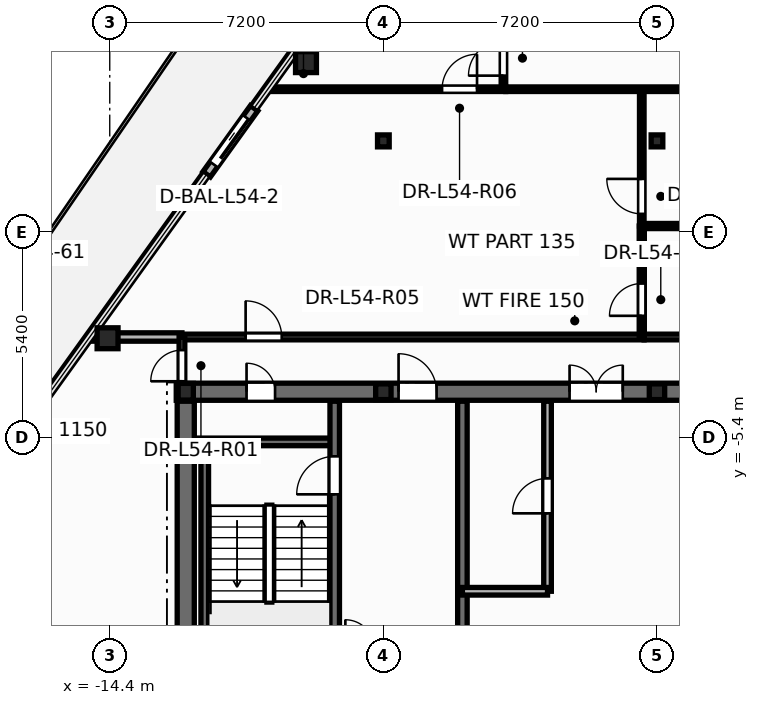
"""IFC4 building model, lengths in metres.
Left out: names, types, materials, properties, quantities, classifications, styles, units other than length and angle.
Written with IfcOpenShell. Run it as: python <this file> out.ifc"""

import sys

from ifc_helpers import new_model, si_unit, direction, frame, frame_2d, origin, origin_2d, place, context, subcontext, project, spatial, rectangle, hollow_circle, i_section, extrude, element, fill, save


model = new_model("IFC4")
c1 = context("Model", 3, precision=1e-05, world=origin(), true_north=direction((0.0, 1.0)))
c2 = subcontext(c1, "Body", "Model", "MODEL_VIEW")
j1 = project(units=[si_unit("LENGTHUNIT", "METRE"), si_unit("PLANEANGLEUNIT", "RADIAN")], contexts=[c1])
p1 = place(None, origin())
s1 = spatial("IfcSite", under=j1, at=p1, CompositionType="ELEMENT")
p2 = place(p1, origin())
s2 = spatial("IfcBuilding", under=s1, at=p2, CompositionType="ELEMENT")
p3 = place(p2, frame((0.0, 0.0, 207.3)))
s3 = spatial("IfcBuildingStorey", under=s2, at=p3, CompositionType="ELEMENT", Elevation=207.3)
for number, where, z_axis, x_axis in (
    (1, (-9.236, 4.473, 0.0), (0.0, 0.0, 1.0), (1.0, 0.0, 0.0)),
    (2, (-14.457, -2.793, 0.0), (0.0, 0.0, 1.0), (1.0, 0.0, 0.0)),
):
    element("IfcColumn", number, at=place(p3, frame(where, z_axis=z_axis, x_axis=x_axis)), inside=s3, PredefinedType="COLUMN", context=c2, shape_type="SweptSolid", body=[
        extrude(hollow_circle(Radius=0.275, WallThickness=0.024, at=origin_2d()), origin(), (0.0, 0.0, 1.0), 3.6),
    ])
p4 = place(p3, frame((-12.4, -4.2, 0.0), z_axis=(0.0, 0.0, 1.0), x_axis=(1.0, 0.0, 0.0)))
e3 = element("IfcColumn", 3, at=p4, inside=s3, PredefinedType="COLUMN", context=c2, shape_type="SweptSolid", body=[
    extrude(i_section(OverallWidth=0.4, OverallDepth=0.44, WebThickness=0.028, FlangeThickness=0.04, at=origin_2d()), origin(), (0.0, 0.0, 1.0), 3.6),
])
for number, where, z_axis, x_axis in (
    (4, (-7.2, -4.2, 0.0), (0.0, 0.0, 1.0), (1.0, 0.0, 0.0)),
    (5, (0.0, -4.2, 0.0), (0.0, 0.0, 1.0), (1.0, 0.0, 0.0)),
):
    element("IfcColumn", number, at=place(p3, frame(where, z_axis=z_axis, x_axis=x_axis)), inside=s3, PredefinedType="PILASTER", context=c2, shape_type="SweptSolid", body=[
        extrude(i_section(OverallWidth=0.405, OverallDepth=0.414, WebThickness=0.022, FlangeThickness=0.032, at=origin_2d()), origin(), (0.0, 0.0, 1.0), 3.6),
    ])
for number, where, z_axis, x_axis in (
    (6, (-7.2, 2.4, 0.0), (0.0, 0.0, 1.0), (1.0, 0.0, 0.0)),
    (7, (0.0, 2.4, 0.0), (0.0, 0.0, 1.0), (1.0, 0.0, 0.0)),
):
    element("IfcColumn", number, at=place(p3, frame(where, z_axis=z_axis, x_axis=x_axis)), inside=s3, PredefinedType="COLUMN", context=c2, shape_type="SweptSolid", body=[
        extrude(i_section(OverallWidth=0.307, OverallDepth=0.314, WebThickness=0.012, FlangeThickness=0.019, at=origin_2d()), origin(), (0.0, 0.0, 1.0), 3.6),
    ])
p5 = place(p3, frame((-10.601, 3.259, -0.015), z_axis=(0.0, 0.0, 1.0), x_axis=(-0.583556118157, -0.812072815061, 0.0)))
e8 = element("IfcWall", 8, at=p5, inside=s3, PredefinedType="STANDARD", context=c2, shape_type="SweptSolid", body=[
    extrude(rectangle(XDim=2.14, YDim=0.24, at=frame_2d((1.07, 0.0))), origin(), (0.0, 0.0, 1.0), 2.802),
])
p6 = place(p5, frame((0.32, 0.0, 0.015)))
e9 = element("IfcOpeningElement", 9, at=p6, cuts=e8, PredefinedType="OPENING", context=c2, shape_type="SweptSolid", body=[
    extrude(rectangle(XDim=1.506, YDim=2.204, at=frame_2d((0.75, 1.102))), frame((0.0, 0.13, 0.0), z_axis=(0.0, -1.0, 0.0), x_axis=(1.0, 0.0, 0.0)), (0.0, 0.0, 1.0), 0.26),
])
p7 = place(p3, frame((-12.65, -4.2, 0.0), z_axis=(0.0, 0.0, 1.0), x_axis=(1.0, 0.0, 0.0)))
e10 = element("IfcWall", 10, at=p7, inside=s3, PredefinedType="SHEAR", context=c2, shape_type="SweptSolid", body=[
    extrude(rectangle(XDim=25.3, YDim=0.45, at=frame_2d((12.65, 0.0))), origin(), (0.0, 0.0, 1.0), 3.6),
])
p8 = place(p7, frame((1.85, 0.0, 0.0)))
e11 = element("IfcOpeningElement", 11, at=p8, cuts=e10, PredefinedType="OPENING", context=c2, shape_type="SweptSolid", body=[
    extrude(rectangle(XDim=0.756, YDim=2.054, at=frame_2d((0.375, 1.027))), frame((0.0, 0.235, 0.0), z_axis=(0.0, -1.0, 0.0), x_axis=(1.0, 0.0, 0.0)), (0.0, 0.0, 1.0), 0.47),
])
p9 = place(p7, frame((22.65, 0.0, 0.0)))
e12 = element("IfcOpeningElement", 12, at=p9, cuts=e10, PredefinedType="OPENING", context=c2, shape_type="SweptSolid", body=[
    extrude(rectangle(XDim=0.756, YDim=2.054, at=frame_2d((0.375, 1.027))), frame((0.0, 0.235, 0.0), z_axis=(0.0, -1.0, 0.0), x_axis=(1.0, 0.0, 0.0)), (0.0, 0.0, 1.0), 0.47),
])
p10 = place(p7, frame((5.85, 0.0, 0.0)))
e13 = element("IfcOpeningElement", 13, at=p10, cuts=e10, PredefinedType="OPENING", context=c2, shape_type="SweptSolid", body=[
    extrude(rectangle(XDim=1.006, YDim=2.104, at=frame_2d((0.5, 1.052))), frame((0.0, 0.235, 0.0), z_axis=(0.0, -1.0, 0.0), x_axis=(1.0, 0.0, 0.0)), (0.0, 0.0, 1.0), 0.47),
])
p11 = place(p7, frame((10.35, 0.0, 0.0)))
e14 = element("IfcOpeningElement", 14, at=p11, cuts=e10, PredefinedType="OPENING", context=c2, shape_type="SweptSolid", body=[
    extrude(rectangle(XDim=1.406, YDim=2.154, at=frame_2d((0.7, 1.077))), frame((0.0, 0.235, 0.0), z_axis=(0.0, -1.0, 0.0), x_axis=(1.0, 0.0, 0.0)), (0.0, 0.0, 1.0), 0.47),
])
p12 = place(p7, frame((18.45, 0.0, 0.0)))
e15 = element("IfcOpeningElement", 15, at=p12, cuts=e10, PredefinedType="OPENING", context=c2, shape_type="SweptSolid", body=[
    extrude(rectangle(XDim=1.006, YDim=2.104, at=frame_2d((0.5, 1.052))), frame((0.0, 0.235, 0.0), z_axis=(0.0, -1.0, 0.0), x_axis=(1.0, 0.0, 0.0)), (0.0, 0.0, 1.0), 0.47),
])
p13 = place(p3, frame((-12.35, -5.52, 0.0), z_axis=(0.0, 0.0, 1.0), x_axis=(1.0, 0.0, 0.0)))
e16 = element("IfcWall", 16, at=p13, inside=s3, PredefinedType="SOLIDWALL", context=c2, shape_type="SweptSolid", body=[
    extrude(rectangle(XDim=3.87, YDim=0.2, at=frame_2d((1.935, 0.0))), origin(), (0.0, 0.0, 1.0), 3.6),
])
p14 = place(p3, frame((-11.9, -13.1, 0.0), z_axis=(0.0, 0.0, 1.0), x_axis=(0.0, 1.0, 0.0)))
e17 = element("IfcWall", 17, at=p14, inside=s3, PredefinedType="SOLIDWALL", context=c2, shape_type="SweptSolid", body=[
    extrude(rectangle(XDim=7.58, YDim=0.2, at=frame_2d((3.79, 0.0))), origin(), (0.0, 0.0, 1.0), 3.6),
])
p15 = place(p3, frame((-8.48, -13.85, 0.0), z_axis=(0.0, 0.0, 1.0), x_axis=(0.0, 1.0, 0.0)))
e18 = element("IfcWall", 18, at=p15, inside=s3, PredefinedType="SHEAR", context=c2, shape_type="SweptSolid", body=[
    extrude(rectangle(XDim=9.4, YDim=0.25, at=frame_2d((4.7, 0.0))), origin(), (0.0, 0.0, 1.0), 3.6),
])
p16 = place(p15, frame((6.95, 0.0, 0.0)))
e19 = element("IfcOpeningElement", 19, at=p16, cuts=e18, PredefinedType="OPENING", context=c2, shape_type="SweptSolid", body=[
    extrude(rectangle(XDim=1.006, YDim=2.104, at=frame_2d((0.5, 1.052))), frame((0.0, 0.135, 0.0), z_axis=(0.0, -1.0, 0.0), x_axis=(1.0, 0.0, 0.0)), (0.0, 0.0, 1.0), 0.27),
])
p17 = place(p3, frame((-5.12, -13.85, 0.0), z_axis=(0.0, 0.0, 1.0), x_axis=(0.0, 1.0, 0.0)))
e20 = element("IfcWall", 20, at=p17, inside=s3, PredefinedType="SHEAR", context=c2, shape_type="SweptSolid", body=[
    extrude(rectangle(XDim=9.4, YDim=0.25, at=frame_2d((4.7, 0.0))), origin(), (0.0, 0.0, 1.0), 3.6),
])
p18 = place(p3, frame((-12.4, -13.85, 0.0), z_axis=(0.0, 0.0, 1.0), x_axis=(0.0, 1.0, 0.0)))
e21 = element("IfcWall", 21, at=p18, inside=s3, PredefinedType="SHEAR", context=c2, shape_type="SweptSolid", body=[
    extrude(rectangle(XDim=9.4, YDim=0.45, at=frame_2d((4.7, 0.0))), origin(), (0.0, 0.0, 1.0), 3.6),
])
p19 = place(p3, frame((-2.88, -9.45, 0.0), z_axis=(0.0, 0.0, 1.0), x_axis=(0.0, 1.0, 0.0)))
e22 = element("IfcWall", 22, at=p19, inside=s3, PredefinedType="SOLIDWALL", context=c2, shape_type="SweptSolid", body=[
    extrude(rectangle(XDim=5.0, YDim=0.2, at=frame_2d((2.5, 0.0))), origin(), (0.0, 0.0, 1.0), 3.345),
])
p20 = place(p19, frame((2.05, 0.0, 0.0)))
e23 = element("IfcOpeningElement", 23, at=p20, cuts=e22, PredefinedType="OPENING", context=c2, shape_type="SweptSolid", body=[
    extrude(rectangle(XDim=0.926, YDim=2.104, at=frame_2d((0.46, 1.052))), frame((0.0, 0.11, 0.0), z_axis=(0.0, -1.0, 0.0), x_axis=(1.0, 0.0, 0.0)), (0.0, 0.0, 1.0), 0.22),
])
p21 = place(p3, frame((-5.12, -9.45, 0.0), z_axis=(0.0, 0.0, 1.0), x_axis=(1.0, 0.0, 0.0)))
e24 = element("IfcWall", 24, at=p21, inside=s3, PredefinedType="SOLIDWALL", context=c2, shape_type="SweptSolid", body=[
    extrude(rectangle(XDim=2.24, YDim=0.2, at=frame_2d((1.12, 0.0))), origin(), (0.0, 0.0, 1.0), 3.345),
])
p22 = place(p3, frame((-12.5, -2.76, 0.0), z_axis=(0.0, 0.0, 1.0), x_axis=(1.0, 0.0, 0.0)))
e25 = element("IfcWall", 25, at=p22, inside=s3, PredefinedType="PARTITIONING", context=c2, shape_type="SweptSolid", body=[
    extrude(rectangle(XDim=12.16, YDim=0.15, at=frame_2d((6.08, 0.0))), origin(), (0.0, 0.0, 1.0), 2.32),
])
p23 = place(p22, frame((1.676, 0.0, 0.0)))
e26 = element("IfcOpeningElement", 26, at=p23, cuts=e25, PredefinedType="OPENING", context=c2, shape_type="SweptSolid", body=[
    extrude(rectangle(XDim=0.956, YDim=2.104, at=frame_2d((0.475, 1.052))), frame((0.0, 0.085, 0.0), z_axis=(0.0, -1.0, 0.0), x_axis=(1.0, 0.0, 0.0)), (0.0, 0.0, 1.0), 0.17),
])
p24 = place(p3, frame((-10.241, 3.76, 0.0), z_axis=(0.0, 0.0, 1.0), x_axis=(1.0, 0.0, 0.0)))
e27 = element("IfcWall", 27, at=p24, inside=s3, PredefinedType="PARTITIONING", context=c2, shape_type="SweptSolid", body=[
    extrude(rectangle(XDim=6.261, YDim=0.12, at=frame_2d((3.13, 0.0))), origin(), (0.0, 0.0, 1.0), 2.62),
])
p25 = place(p24, frame((4.586, 0.0, 0.0)))
e28 = element("IfcOpeningElement", 28, at=p25, cuts=e27, PredefinedType="OPENING", context=c2, shape_type="SweptSolid", body=[
    extrude(rectangle(XDim=0.926, YDim=2.104, at=frame_2d((0.46, 1.052))), frame((0.0, 0.07, 0.0), z_axis=(0.0, -1.0, 0.0), x_axis=(1.0, 0.0, 0.0)), (0.0, 0.0, 1.0), 0.14),
])
p26 = place(p3, frame((-4.04, 3.76, 0.0), z_axis=(0.0, 0.0, 1.0), x_axis=(0.0, 1.0, 0.0)))
e29 = element("IfcWall", 29, at=p26, inside=s3, PredefinedType="PARTITIONING", context=c2, shape_type="SweptSolid", body=[
    extrude(rectangle(XDim=4.48, YDim=0.12, at=frame_2d((2.24, 0.0))), origin(), (0.0, 0.0, 1.0), 3.345),
])
p27 = place(p26, frame((0.357, 0.0, 0.0)))
e30 = element("IfcOpeningElement", 30, at=p27, cuts=e29, PredefinedType="OPENING", context=c2, shape_type="SweptSolid", body=[
    extrude(rectangle(XDim=0.926, YDim=2.104, at=frame_2d((0.46, 1.052))), frame((0.0, 0.07, 0.0), z_axis=(0.0, -1.0, 0.0), x_axis=(1.0, 0.0, 0.0)), (0.0, 0.0, 1.0), 0.14),
])
p28 = place(p3, frame((-3.978, 3.76, 0.0), z_axis=(0.0, 0.0, 1.0), x_axis=(1.0, 0.0, 0.0)))
e31 = element("IfcWall", 31, at=p28, inside=s3, PredefinedType="PARTITIONING", context=c2, shape_type="SweptSolid", body=[
    extrude(rectangle(XDim=8.778, YDim=0.12, at=frame_2d((4.389, 0.0))), origin(), (0.0, 0.0, 1.0), 2.32),
])
p29 = place(p3, frame((-0.4, 0.16, 0.0), z_axis=(0.0, 0.0, 1.0), x_axis=(0.0, 1.0, 0.0)))
e32 = element("IfcWall", 32, at=p29, inside=s3, PredefinedType="PARTITIONING", context=c2, shape_type="SweptSolid", body=[
    extrude(rectangle(XDim=3.6, YDim=0.12, at=frame_2d((1.8, 0.0))), origin(), (0.0, 0.0, 1.0), 2.32),
])
p30 = place(p29, frame((0.32, 0.0, 0.0)))
e33 = element("IfcOpeningElement", 33, at=p30, cuts=e32, PredefinedType="OPENING", context=c2, shape_type="SweptSolid", body=[
    extrude(rectangle(XDim=0.926, YDim=2.104, at=frame_2d((0.46, 1.052))), frame((0.0, 0.07, 0.0), z_axis=(0.0, -1.0, 0.0), x_axis=(1.0, 0.0, 0.0)), (0.0, 0.0, 1.0), 0.14),
])
p31 = place(p3, frame((-0.4, -2.76, 0.0), z_axis=(0.0, 0.0, 1.0), x_axis=(0.0, 1.0, 0.0)))
e34 = element("IfcWall", 34, at=p31, inside=s3, PredefinedType="PARTITIONING", context=c2, shape_type="SweptSolid", body=[
    extrude(rectangle(XDim=2.92, YDim=0.135, at=frame_2d((1.46, 0.0))), origin(), (0.0, 0.0, 1.0), 3.345),
])
p32 = place(p31, frame((0.558, 0.0, 0.0)))
e35 = element("IfcOpeningElement", 35, at=p32, cuts=e34, PredefinedType="OPENING", context=c2, shape_type="SweptSolid", body=[
    extrude(rectangle(XDim=0.856, YDim=2.104, at=frame_2d((0.425, 1.052))), frame((0.0, 0.078, 0.0), z_axis=(0.0, -1.0, 0.0), x_axis=(1.0, 0.0, 0.0)), (0.0, 0.0, 1.0), 0.155),
])
p33 = place(p3, frame((-0.338, -2.76, 0.0), z_axis=(0.0, 0.0, 1.0), x_axis=(1.0, 0.0, 0.0)))
e36 = element("IfcWall", 36, at=p33, inside=s3, PredefinedType="PARTITIONING", context=c2, shape_type="SweptSolid", body=[
    extrude(rectangle(XDim=5.076, YDim=0.15, at=frame_2d((2.538, 0.0))), origin(), (0.0, 0.0, 1.0), 2.32),
])
p34 = place(p3, frame((-0.4, 0.16, 0.0), z_axis=(0.0, 0.0, 1.0), x_axis=(1.0, 0.0, 0.0)))
e37 = element("IfcWall", 37, at=p34, inside=s3, PredefinedType="PARTITIONING", context=c2, shape_type="SweptSolid", body=[
    extrude(rectangle(XDim=5.2, YDim=0.135, at=frame_2d((2.6, 0.0))), origin(), (0.0, 0.0, 1.0), 2.32),
])
p35 = place(p3, frame((-14.926, -2.76, 0.0), z_axis=(0.0, 0.0, 1.0), x_axis=(1.0, 0.0, 0.0)))
e38 = element("IfcWall", 38, at=p35, inside=s3, PredefinedType="PARTITIONING", context=c2, shape_type="SweptSolid", body=[
    extrude(rectangle(XDim=2.426, YDim=0.22, at=frame_2d((1.213, 0.0))), origin(), (0.0, 0.0, 1.0), 2.62),
])
p36 = place(p3, frame((-12.5, -4.24, 0.0), z_axis=(0.0, 0.0, 1.0), x_axis=(0.0, 1.0, 0.0)))
e39 = element("IfcWall", 39, at=p36, inside=s3, PredefinedType="PARTITIONING", context=c2, shape_type="SweptSolid", body=[
    extrude(rectangle(XDim=1.48, YDim=0.15, at=frame_2d((0.74, 0.0))), origin(), (0.0, 0.0, 1.0), 2.32),
])
p37 = place(p36, frame((0.315, 0.0, 0.0)))
e40 = element("IfcOpeningElement", 40, at=p37, cuts=e39, PredefinedType="OPENING", context=c2, shape_type="SweptSolid", body=[
    extrude(rectangle(XDim=0.826, YDim=2.104, at=frame_2d((0.41, 1.052))), frame((0.0, 0.085, 0.0), z_axis=(0.0, -1.0, 0.0), x_axis=(1.0, 0.0, 0.0)), (0.0, 0.0, 1.0), 0.17),
])
p38 = place(p6, origin())
e41 = element("IfcDoor", 41, at=p38, inside=s3, OperationType="SLIDING_TO_RIGHT", PredefinedType="DOOR", context=c2, shape_type="SweptSolid", body=[
    extrude(rectangle(XDim=1.5, YDim=2.2, at=frame_2d((0.75, 1.1))), frame((0.0, 0.025, 0.0), z_axis=(0.0, -1.0, 0.0), x_axis=(1.0, 0.0, 0.0)), (0.0, 0.0, 1.0), 0.05),
])
fill(e9, e41)
p39 = place(p20, origin())
e42 = element("IfcDoor", 42, at=p39, inside=s3, OperationType="SINGLE_SWING_LEFT", PredefinedType="DOOR", context=c2, shape_type="SweptSolid", body=[
    extrude(rectangle(XDim=0.92, YDim=2.1, at=frame_2d((0.46, 1.05))), frame((0.0, 0.025, 0.0), z_axis=(0.0, -1.0, 0.0), x_axis=(1.0, 0.0, 0.0)), (0.0, 0.0, 1.0), 0.05),
])
fill(e23, e42)
p40 = place(p16, origin())
e43 = element("IfcDoor", 43, at=p40, inside=s3, OperationType="SINGLE_SWING_LEFT", PredefinedType="DOOR", context=c2, shape_type="SweptSolid", body=[
    extrude(rectangle(XDim=1.0, YDim=2.1, at=frame_2d((0.5, 1.05))), frame((0.0, 0.025, 0.0), z_axis=(0.0, -1.0, 0.0), x_axis=(1.0, 0.0, 0.0)), (0.0, 0.0, 1.0), 0.05),
])
fill(e19, e43)
p41 = place(p8, origin())
e44 = element("IfcDoor", 44, at=p41, inside=s3, OperationType="SINGLE_SWING_LEFT", PredefinedType="DOOR", context=c2, shape_type="SweptSolid", body=[
    extrude(rectangle(XDim=0.75, YDim=2.05, at=frame_2d((0.375, 1.025))), frame((0.0, 0.025, 0.0), z_axis=(0.0, -1.0, 0.0), x_axis=(1.0, 0.0, 0.0)), (0.0, 0.0, 1.0), 0.05),
])
fill(e11, e44)
p42 = place(p10, origin())
e45 = element("IfcDoor", 45, at=p42, inside=s3, OperationType="SINGLE_SWING_LEFT", PredefinedType="DOOR", context=c2, shape_type="SweptSolid", body=[
    extrude(rectangle(XDim=1.0, YDim=2.1, at=frame_2d((0.5, 1.05))), frame((0.0, 0.025, 0.0), z_axis=(0.0, -1.0, 0.0), x_axis=(1.0, 0.0, 0.0)), (0.0, 0.0, 1.0), 0.05),
])
fill(e13, e45)
p43 = place(p11, origin())
e46 = element("IfcDoor", 46, at=p43, inside=s3, OperationType="DOUBLE_DOOR_SINGLE_SWING", PredefinedType="DOOR", context=c2, shape_type="SweptSolid", body=[
    extrude(rectangle(XDim=1.4, YDim=2.15, at=frame_2d((0.7, 1.075))), frame((0.0, 0.025, 0.0), z_axis=(0.0, -1.0, 0.0), x_axis=(1.0, 0.0, 0.0)), (0.0, 0.0, 1.0), 0.05),
])
fill(e14, e46)
p44 = place(p37, origin())
e47 = element("IfcDoor", 47, at=p44, inside=s3, OperationType="SINGLE_SWING_LEFT", PredefinedType="DOOR", context=c2, shape_type="SweptSolid", body=[
    extrude(rectangle(XDim=0.82, YDim=2.1, at=frame_2d((0.41, 1.05))), frame((0.0, 0.025, 0.0), z_axis=(0.0, -1.0, 0.0), x_axis=(1.0, 0.0, 0.0)), (0.0, 0.0, 1.0), 0.05),
])
fill(e40, e47)
p45 = place(p32, origin())
e48 = element("IfcDoor", 48, at=p45, inside=s3, OperationType="SINGLE_SWING_LEFT", PredefinedType="DOOR", context=c2, shape_type="SweptSolid", body=[
    extrude(rectangle(XDim=0.85, YDim=2.1, at=frame_2d((0.425, 1.05))), frame((0.0, 0.025, 0.0), z_axis=(0.0, -1.0, 0.0), x_axis=(1.0, 0.0, 0.0)), (0.0, 0.0, 1.0), 0.05),
])
fill(e35, e48)
p46 = place(p30, origin())
e49 = element("IfcDoor", 49, at=p46, inside=s3, OperationType="SINGLE_SWING_RIGHT", PredefinedType="DOOR", context=c2, shape_type="SweptSolid", body=[
    extrude(rectangle(XDim=0.92, YDim=2.1, at=frame_2d((0.46, 1.05))), frame((0.0, 0.025, 0.0), z_axis=(0.0, -1.0, 0.0), x_axis=(1.0, 0.0, 0.0)), (0.0, 0.0, 1.0), 0.05),
])
fill(e33, e49)
p47 = place(p23, origin())
e50 = element("IfcDoor", 50, at=p47, inside=s3, OperationType="SINGLE_SWING_LEFT", PredefinedType="DOOR", context=c2, shape_type="SweptSolid", body=[
    extrude(rectangle(XDim=0.95, YDim=2.1, at=frame_2d((0.475, 1.05))), frame((0.0, 0.025, 0.0), z_axis=(0.0, -1.0, 0.0), x_axis=(1.0, 0.0, 0.0)), (0.0, 0.0, 1.0), 0.05),
])
fill(e26, e50)
p48 = place(p25, origin())
e51 = element("IfcDoor", 51, at=p48, inside=s3, OperationType="SINGLE_SWING_RIGHT", PredefinedType="DOOR", context=c2, shape_type="SweptSolid", body=[
    extrude(rectangle(XDim=0.92, YDim=2.1, at=frame_2d((0.46, 1.05))), frame((0.0, 0.025, 0.0), z_axis=(0.0, -1.0, 0.0), x_axis=(1.0, 0.0, 0.0)), (0.0, 0.0, 1.0), 0.05),
])
fill(e28, e51)
p49 = place(p27, origin())
e52 = element("IfcDoor", 52, at=p49, inside=s3, OperationType="SINGLE_SWING_LEFT", PredefinedType="DOOR", context=c2, shape_type="SweptSolid", body=[
    extrude(rectangle(XDim=0.92, YDim=2.1, at=frame_2d((0.46, 1.05))), frame((0.0, 0.025, 0.0), z_axis=(0.0, -1.0, 0.0), x_axis=(1.0, 0.0, 0.0)), (0.0, 0.0, 1.0), 0.05),
])
fill(e30, e52)
save(model, sys.argv[1])
